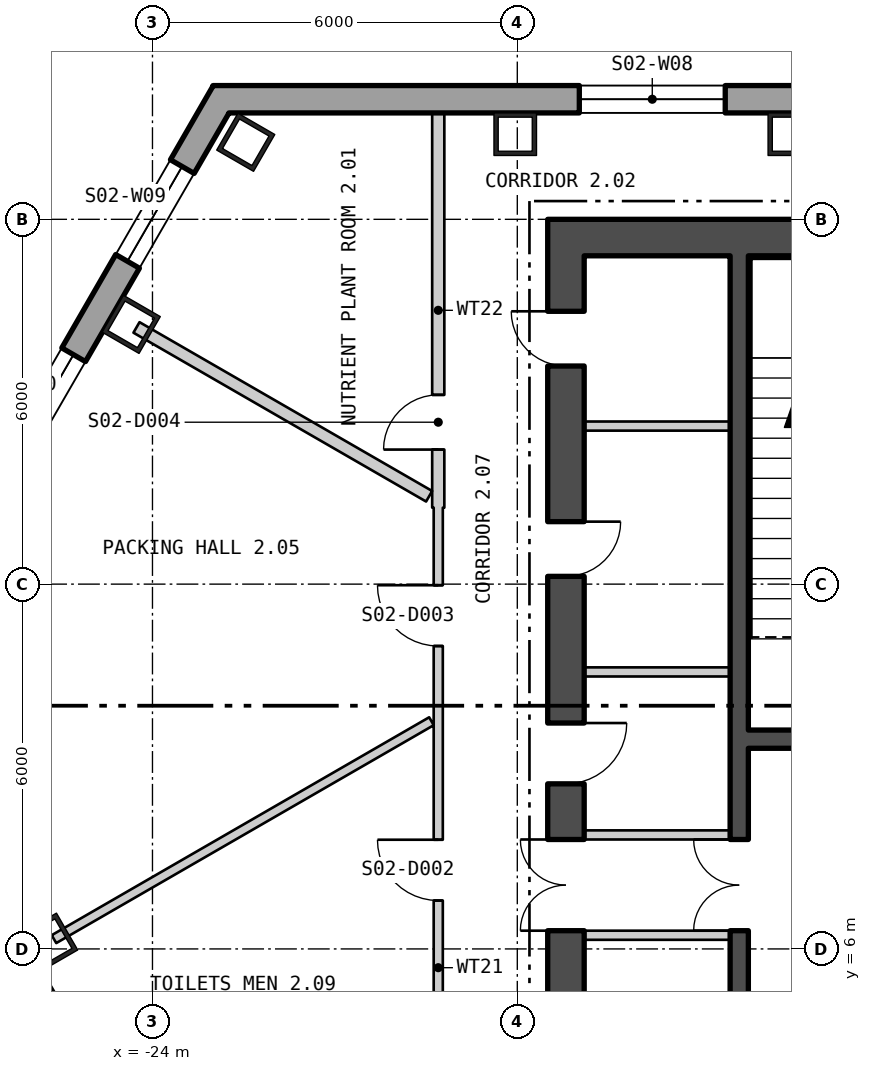
"""IFC4 building model, lengths in metres.
Left out: names, types, materials, properties, quantities, classifications, styles, units other than length and angle.
Written with IfcOpenShell. Run it as: python <this file> out.ifc"""

import sys

from ifc_helpers import new_model, si_unit, direction, frame, frame_2d, origin, origin_2d, place, context, subcontext, project, spatial, polyline, rectangle, hollow_rectangle, outline, extrude, element, fill, save


model = new_model("IFC4")
c1 = context("Model", 3, precision=1e-05, world=origin(), true_north=direction((0.0, 1.0)))
c2 = subcontext(c1, "Body", "Model", "MODEL_VIEW")
j1 = project(units=[si_unit("LENGTHUNIT", "METRE"), si_unit("PLANEANGLEUNIT", "RADIAN")], contexts=[c1])
p1 = place(None, origin())
s1 = spatial("IfcSite", under=j1, at=p1, CompositionType="ELEMENT")
p2 = place(p1, origin())
s2 = spatial("IfcBuilding", under=s1, at=p2, CompositionType="ELEMENT")
p3 = place(p2, frame((0.0, 0.0, 33.3)))
s3 = spatial("IfcBuildingStorey", under=s2, at=p3, CompositionType="ELEMENT", Elevation=33.3)
for number, where, z_axis, x_axis in (
    (1, (-13.526, 19.4, 0.0), (0.0, 0.0, 1.0), (-1.0, 0.0, 0.0)),
    (2, (-18.034, 19.4, 0.0), (0.0, 0.0, 1.0), (-1.0, 0.0, 0.0)),
    (3, (-22.466, 19.267, 0.0), (0.0, 0.0, 1.0), (-0.5, -0.866, 0.0)),
    (4, (-24.349, 16.272, 0.0), (0.0, 0.0, 1.0), (-0.5, -0.866, 0.0)),
    (5, (-25.707, 6.111, 0.0), (0.0, 0.0, 1.0), (0.5, -0.866, 0.0)),
):
    element("IfcColumn", number, at=place(p3, frame(where, z_axis=z_axis, x_axis=x_axis)), inside=s3, PredefinedType="COLUMN", context=c2, shape_type="SweptSolid", body=[
        extrude(hollow_rectangle(XDim=0.7, YDim=0.7, WallThickness=0.07, at=origin_2d()), origin(), (0.0, 0.0, 1.0), 4.5),
    ])
p4 = place(p3, frame((22.875, 19.975, -0.4), z_axis=(0.0, 0.0, 1.0), x_axis=(-1.0, 0.0, 0.0)))
e6 = element("IfcWall", 6, at=p4, inside=s3, PredefinedType="SOLIDWALL", context=c2, shape_type="SweptSolid", body=[
    extrude(outline(polyline([(-0.13, -0.225), (45.88, -0.225), (45.62, 0.225), (0.13, 0.225), (-0.13, -0.225)])), origin(), (0.0, 0.0, 1.0), 4.5),
])
p5 = place(p4, frame((5.895, 0.0, 1.3)))
e7 = element("IfcOpeningElement", 7, at=p5, cuts=e6, PredefinedType="OPENING", context=c2, shape_type="SweptSolid", body=[
    extrude(rectangle(XDim=2.4, YDim=2.6, at=frame_2d((1.2, 1.3))), frame((0.0, 0.235, 0.0), z_axis=(0.0, -1.0, 0.0), x_axis=(1.0, 0.0, 0.0)), (0.0, 0.0, 1.0), 0.47),
])
p6 = place(p4, frame((10.403, 0.0, 1.3)))
e8 = element("IfcOpeningElement", 8, at=p6, cuts=e6, PredefinedType="OPENING", context=c2, shape_type="SweptSolid", body=[
    extrude(rectangle(XDim=2.4, YDim=2.6, at=frame_2d((1.2, 1.3))), frame((0.0, 0.235, 0.0), z_axis=(0.0, -1.0, 0.0), x_axis=(1.0, 0.0, 0.0)), (0.0, 0.0, 1.0), 0.47),
])
p7 = place(p4, frame((14.912, 0.0, 1.3)))
e9 = element("IfcOpeningElement", 9, at=p7, cuts=e6, PredefinedType="OPENING", context=c2, shape_type="SweptSolid", body=[
    extrude(rectangle(XDim=2.4, YDim=2.6, at=frame_2d((1.2, 1.3))), frame((0.0, 0.235, 0.0), z_axis=(0.0, -1.0, 0.0), x_axis=(1.0, 0.0, 0.0)), (0.0, 0.0, 1.0), 0.47),
])
p8 = place(p4, frame((19.421, 0.0, 1.3)))
e10 = element("IfcOpeningElement", 10, at=p8, cuts=e6, PredefinedType="OPENING", context=c2, shape_type="SweptSolid", body=[
    extrude(rectangle(XDim=2.4, YDim=2.6, at=frame_2d((1.2, 1.3))), frame((0.0, 0.235, 0.0), z_axis=(0.0, -1.0, 0.0), x_axis=(1.0, 0.0, 0.0)), (0.0, 0.0, 1.0), 0.47),
])
p9 = place(p4, frame((23.929, 0.0, 1.3)))
e11 = element("IfcOpeningElement", 11, at=p9, cuts=e6, PredefinedType="OPENING", context=c2, shape_type="SweptSolid", body=[
    extrude(rectangle(XDim=2.4, YDim=2.6, at=frame_2d((1.2, 1.3))), frame((0.0, 0.235, 0.0), z_axis=(0.0, -1.0, 0.0), x_axis=(1.0, 0.0, 0.0)), (0.0, 0.0, 1.0), 0.47),
])
p10 = place(p4, frame((28.438, 0.0, 1.3)))
e12 = element("IfcOpeningElement", 12, at=p10, cuts=e6, PredefinedType="OPENING", context=c2, shape_type="SweptSolid", body=[
    extrude(rectangle(XDim=2.4, YDim=2.6, at=frame_2d((1.2, 1.3))), frame((0.0, 0.235, 0.0), z_axis=(0.0, -1.0, 0.0), x_axis=(1.0, 0.0, 0.0)), (0.0, 0.0, 1.0), 0.47),
])
p11 = place(p4, frame((32.947, 0.0, 1.3)))
e13 = element("IfcOpeningElement", 13, at=p11, cuts=e6, PredefinedType="OPENING", context=c2, shape_type="SweptSolid", body=[
    extrude(rectangle(XDim=2.4, YDim=2.6, at=frame_2d((1.2, 1.3))), frame((0.0, 0.235, 0.0), z_axis=(0.0, -1.0, 0.0), x_axis=(1.0, 0.0, 0.0)), (0.0, 0.0, 1.0), 0.47),
])
p12 = place(p4, frame((37.455, 0.0, 1.3)))
e14 = element("IfcOpeningElement", 14, at=p12, cuts=e6, PredefinedType="OPENING", context=c2, shape_type="SweptSolid", body=[
    extrude(rectangle(XDim=2.4, YDim=2.6, at=frame_2d((1.2, 1.3))), frame((0.0, 0.235, 0.0), z_axis=(0.0, -1.0, 0.0), x_axis=(1.0, 0.0, 0.0)), (0.0, 0.0, 1.0), 0.47),
])
p13 = place(p3, frame((-22.871, 19.973, -0.4), z_axis=(0.0, 0.0, 1.0), x_axis=(-0.500002460556, -0.866023983177, 0.0)))
e15 = element("IfcWall", 15, at=p13, inside=s3, PredefinedType="SOLIDWALL", context=c2, shape_type="SweptSolid", body=[
    extrude(outline(polyline([(-0.13, -0.225), (11.63, -0.225), (11.37, 0.225), (0.13, 0.225), (-0.13, -0.225)])), origin(), (0.0, 0.0, 1.0), 4.5),
])
p14 = place(p13, frame((1.276, 0.0, 1.3)))
e16 = element("IfcOpeningElement", 16, at=p14, cuts=e15, PredefinedType="OPENING", context=c2, shape_type="SweptSolid", body=[
    extrude(rectangle(XDim=1.8, YDim=2.6, at=frame_2d((0.9, 1.3))), frame((0.0, 0.235, 0.0), z_axis=(0.0, -1.0, 0.0), x_axis=(1.0, 0.0, 0.0)), (0.0, 0.0, 1.0), 0.47),
])
p15 = place(p13, frame((4.85, 0.0, 1.3)))
e17 = element("IfcOpeningElement", 17, at=p15, cuts=e15, PredefinedType="OPENING", context=c2, shape_type="SweptSolid", body=[
    extrude(rectangle(XDim=1.8, YDim=2.6, at=frame_2d((0.9, 1.3))), frame((0.0, 0.235, 0.0), z_axis=(0.0, -1.0, 0.0), x_axis=(1.0, 0.0, 0.0)), (0.0, 0.0, 1.0), 0.47),
])
p16 = place(p13, frame((8.424, 0.0, 1.3)))
e18 = element("IfcOpeningElement", 18, at=p16, cuts=e15, PredefinedType="OPENING", context=c2, shape_type="SweptSolid", body=[
    extrude(rectangle(XDim=1.8, YDim=2.6, at=frame_2d((0.9, 1.3))), frame((0.0, 0.235, 0.0), z_axis=(0.0, -1.0, 0.0), x_axis=(1.0, 0.0, 0.0)), (0.0, 0.0, 1.0), 0.47),
])
p17 = place(p3, frame((-28.625, 10.015, -0.18), z_axis=(0.0, 0.0, 1.0), x_axis=(0.500000335318, -0.866025210188, 0.0)))
e19 = element("IfcWall", 19, at=p17, inside=s3, PredefinedType="SOLIDWALL", context=c2, shape_type="SweptSolid", body=[
    extrude(outline(polyline([(-0.13, -0.225), (45.88, -0.225), (45.62, 0.225), (0.13, 0.225), (-0.13, -0.225)])), origin(), (0.0, 0.0, 1.0), 4.28),
])
p18 = place(p17, frame((1.425, 0.0, 1.08)))
e20 = element("IfcOpeningElement", 20, at=p18, cuts=e19, PredefinedType="OPENING", context=c2, shape_type="SweptSolid", body=[
    extrude(rectangle(XDim=2.4, YDim=2.6, at=frame_2d((1.2, 1.3))), frame((0.0, 0.235, 0.0), z_axis=(0.0, -1.0, 0.0), x_axis=(1.0, 0.0, 0.0)), (0.0, 0.0, 1.0), 0.47),
])
p19 = place(p17, frame((5.895, 0.0, 1.08)))
e21 = element("IfcOpeningElement", 21, at=p19, cuts=e19, PredefinedType="OPENING", context=c2, shape_type="SweptSolid", body=[
    extrude(rectangle(XDim=2.4, YDim=2.6, at=frame_2d((1.2, 1.3))), frame((0.0, 0.235, 0.0), z_axis=(0.0, -1.0, 0.0), x_axis=(1.0, 0.0, 0.0)), (0.0, 0.0, 1.0), 0.47),
])
p20 = place(p17, frame((10.403, 0.0, 1.08)))
e22 = element("IfcOpeningElement", 22, at=p20, cuts=e19, PredefinedType="OPENING", context=c2, shape_type="SweptSolid", body=[
    extrude(rectangle(XDim=2.4, YDim=2.6, at=frame_2d((1.2, 1.3))), frame((0.0, 0.235, 0.0), z_axis=(0.0, -1.0, 0.0), x_axis=(1.0, 0.0, 0.0)), (0.0, 0.0, 1.0), 0.47),
])
p21 = place(p17, frame((14.912, 0.0, 1.08)))
e23 = element("IfcOpeningElement", 23, at=p21, cuts=e19, PredefinedType="OPENING", context=c2, shape_type="SweptSolid", body=[
    extrude(rectangle(XDim=2.4, YDim=2.6, at=frame_2d((1.2, 1.3))), frame((0.0, 0.235, 0.0), z_axis=(0.0, -1.0, 0.0), x_axis=(1.0, 0.0, 0.0)), (0.0, 0.0, 1.0), 0.47),
])
p22 = place(p17, frame((19.421, 0.0, 1.08)))
e24 = element("IfcOpeningElement", 24, at=p22, cuts=e19, PredefinedType="OPENING", context=c2, shape_type="SweptSolid", body=[
    extrude(rectangle(XDim=2.4, YDim=2.6, at=frame_2d((1.2, 1.3))), frame((0.0, 0.235, 0.0), z_axis=(0.0, -1.0, 0.0), x_axis=(1.0, 0.0, 0.0)), (0.0, 0.0, 1.0), 0.47),
])
p23 = place(p17, frame((23.929, 0.0, 1.08)))
e25 = element("IfcOpeningElement", 25, at=p23, cuts=e19, PredefinedType="OPENING", context=c2, shape_type="SweptSolid", body=[
    extrude(rectangle(XDim=2.4, YDim=2.6, at=frame_2d((1.2, 1.3))), frame((0.0, 0.235, 0.0), z_axis=(0.0, -1.0, 0.0), x_axis=(1.0, 0.0, 0.0)), (0.0, 0.0, 1.0), 0.47),
])
p24 = place(p17, frame((28.438, 0.0, 1.08)))
e26 = element("IfcOpeningElement", 26, at=p24, cuts=e19, PredefinedType="OPENING", context=c2, shape_type="SweptSolid", body=[
    extrude(rectangle(XDim=2.4, YDim=2.6, at=frame_2d((1.2, 1.3))), frame((0.0, 0.235, 0.0), z_axis=(0.0, -1.0, 0.0), x_axis=(1.0, 0.0, 0.0)), (0.0, 0.0, 1.0), 0.47),
])
p25 = place(p17, frame((32.947, 0.0, 1.08)))
e27 = element("IfcOpeningElement", 27, at=p25, cuts=e19, PredefinedType="OPENING", context=c2, shape_type="SweptSolid", body=[
    extrude(rectangle(XDim=2.4, YDim=2.6, at=frame_2d((1.2, 1.3))), frame((0.0, 0.235, 0.0), z_axis=(0.0, -1.0, 0.0), x_axis=(1.0, 0.0, 0.0)), (0.0, 0.0, 1.0), 0.47),
])
p26 = place(p17, frame((37.455, 0.0, 1.08)))
e28 = element("IfcOpeningElement", 28, at=p26, cuts=e19, PredefinedType="OPENING", context=c2, shape_type="SweptSolid", body=[
    extrude(rectangle(XDim=2.4, YDim=2.6, at=frame_2d((1.2, 1.3))), frame((0.0, 0.235, 0.0), z_axis=(0.0, -1.0, 0.0), x_axis=(1.0, 0.0, 0.0)), (0.0, 0.0, 1.0), 0.47),
])
p27 = place(p17, frame((41.925, 0.0, 1.08)))
e29 = element("IfcOpeningElement", 29, at=p27, cuts=e19, PredefinedType="OPENING", context=c2, shape_type="SweptSolid", body=[
    extrude(rectangle(XDim=2.4, YDim=2.6, at=frame_2d((1.2, 1.3))), frame((0.0, 0.235, 0.0), z_axis=(0.0, -1.0, 0.0), x_axis=(1.0, 0.0, 0.0)), (0.0, 0.0, 1.0), 0.47),
])
p28 = place(p3, frame((-17.5, 17.7, 0.0), z_axis=(0.0, 0.0, 1.0), x_axis=(1.0, 0.0, 0.0)))
e30 = element("IfcWall", 30, at=p28, inside=s3, PredefinedType="SHEAR", context=c2, shape_type="SweptSolid", body=[
    extrude(rectangle(XDim=35.0, YDim=0.6, at=frame_2d((17.5, 0.0))), origin(), (0.0, 0.0, 1.0), 4.3),
])
p29 = place(p3, frame((-17.2, 0.6, 0.0), z_axis=(0.0, 0.0, 1.0), x_axis=(0.0, 1.0, 0.0)))
e31 = element("IfcWall", 31, at=p29, inside=s3, PredefinedType="SHEAR", context=c2, shape_type="SweptSolid", body=[
    extrude(rectangle(XDim=16.8, YDim=0.6, at=frame_2d((8.4, 0.0))), origin(), (0.0, 0.0, 1.0), 4.3),
])
p30 = place(p29, frame((5.7, 0.0, 0.0)))
e32 = element("IfcOpeningElement", 32, at=p30, cuts=e31, PredefinedType="OPENING", context=c2, shape_type="SweptSolid", body=[
    extrude(rectangle(XDim=1.5, YDim=2.1, at=frame_2d((0.75, 1.05))), frame((0.0, 0.31, 0.0), z_axis=(0.0, -1.0, 0.0), x_axis=(1.0, 0.0, 0.0)), (0.0, 0.0, 1.0), 0.62),
])
p31 = place(p29, frame((0.875, 0.0, 0.0)))
e33 = element("IfcOpeningElement", 33, at=p31, cuts=e31, PredefinedType="OPENING", context=c2, shape_type="SweptSolid", body=[
    extrude(rectangle(XDim=0.9, YDim=2.1, at=frame_2d((0.45, 1.05))), frame((0.0, 0.31, 0.0), z_axis=(0.0, -1.0, 0.0), x_axis=(1.0, 0.0, 0.0)), (0.0, 0.0, 1.0), 0.62),
])
p32 = place(p29, frame((3.724, 0.0, 0.0)))
e34 = element("IfcOpeningElement", 34, at=p32, cuts=e31, PredefinedType="OPENING", context=c2, shape_type="SweptSolid", body=[
    extrude(rectangle(XDim=0.9, YDim=2.1, at=frame_2d((0.45, 1.05))), frame((0.0, 0.31, 0.0), z_axis=(0.0, -1.0, 0.0), x_axis=(1.0, 0.0, 0.0)), (0.0, 0.0, 1.0), 0.62),
])
p33 = place(p29, frame((8.115, 0.0, 0.0)))
e35 = element("IfcOpeningElement", 35, at=p33, cuts=e31, PredefinedType="OPENING", context=c2, shape_type="SweptSolid", body=[
    extrude(rectangle(XDim=1.0, YDim=2.1, at=frame_2d((0.5, 1.05))), frame((0.0, 0.31, 0.0), z_axis=(0.0, -1.0, 0.0), x_axis=(1.0, 0.0, 0.0)), (0.0, 0.0, 1.0), 0.62),
])
p34 = place(p29, frame((11.528, 0.0, 0.0)))
e36 = element("IfcOpeningElement", 36, at=p34, cuts=e31, PredefinedType="OPENING", context=c2, shape_type="SweptSolid", body=[
    extrude(rectangle(XDim=0.9, YDim=2.1, at=frame_2d((0.45, 1.05))), frame((0.0, 0.31, 0.0), z_axis=(0.0, -1.0, 0.0), x_axis=(1.0, 0.0, 0.0)), (0.0, 0.0, 1.0), 0.62),
])
p35 = place(p29, frame((14.987, 0.0, 0.0)))
e37 = element("IfcOpeningElement", 37, at=p35, cuts=e31, PredefinedType="OPENING", context=c2, shape_type="SweptSolid", body=[
    extrude(rectangle(XDim=0.9, YDim=2.1, at=frame_2d((0.45, 1.05))), frame((0.0, 0.31, 0.0), z_axis=(0.0, -1.0, 0.0), x_axis=(1.0, 0.0, 0.0)), (0.0, 0.0, 1.0), 0.62),
])
p36 = place(p3, frame((-14.35, 0.6, 0.0), z_axis=(0.0, 0.0, 1.0), x_axis=(0.0, 1.0, 0.0)))
e38 = element("IfcWall", 38, at=p36, inside=s3, PredefinedType="SHEAR", context=c2, shape_type="SweptSolid", body=[
    extrude(rectangle(XDim=16.8, YDim=0.3, at=frame_2d((8.4, 0.0))), origin(), (0.0, 0.0, 1.0), 4.3),
])
p37 = place(p36, frame((5.7, 0.0, 0.0)))
e39 = element("IfcOpeningElement", 39, at=p37, cuts=e38, PredefinedType="OPENING", context=c2, shape_type="SweptSolid", body=[
    extrude(rectangle(XDim=1.5, YDim=2.1, at=frame_2d((0.75, 1.05))), frame((0.0, 0.16, 0.0), z_axis=(0.0, -1.0, 0.0), x_axis=(1.0, 0.0, 0.0)), (0.0, 0.0, 1.0), 0.32),
])
p38 = place(p3, frame((-14.2, 9.45, 0.0), z_axis=(0.0, 0.0, 1.0), x_axis=(1.0, 0.0, 0.0)))
e40 = element("IfcWall", 40, at=p38, inside=s3, PredefinedType="SHEAR", context=c2, shape_type="SweptSolid", body=[
    extrude(rectangle(XDim=3.2, YDim=0.3, at=frame_2d((1.6, 0.0))), origin(), (0.0, 0.0, 1.0), 4.3),
])
p39 = place(p38, frame((1.0, 0.0, 0.0)))
e41 = element("IfcOpeningElement", 41, at=p39, cuts=e40, PredefinedType="OPENING", context=c2, shape_type="SweptSolid", body=[
    extrude(rectangle(XDim=1.2, YDim=2.1, at=frame_2d((0.6, 1.05))), frame((0.0, 0.16, 0.0), z_axis=(0.0, -1.0, 0.0), x_axis=(1.0, 0.0, 0.0)), (0.0, 0.0, 1.0), 0.32),
])
for number, where, z_axis, x_axis in (
    (42, (-16.9, 6.225, 0.0), (0.0, 0.0, 1.0), (1.0, 0.0, 0.0)),
    (43, (-16.9, 7.875, 0.0), (0.0, 0.0, 1.0), (1.0, 0.0, 0.0)),
    (44, (-16.9, 10.556, 0.0), (0.0, 0.0, 1.0), (1.0, 0.0, 0.0)),
    (45, (-16.9, 14.6, 0.0), (0.0, 0.0, 1.0), (1.0, 0.0, 0.0)),
):
    element("IfcWall", number, at=place(p3, frame(where, z_axis=z_axis, x_axis=x_axis)), inside=s3, PredefinedType="PARTITIONING", context=c2, shape_type="SweptSolid", body=[
        extrude(rectangle(XDim=2.4, YDim=0.15, at=frame_2d((1.2, 0.0))), origin(), (0.0, 0.0, 1.0), 4.3),
    ])
p40 = place(p3, frame((-25.62, 6.161, 0.0), z_axis=(0.0, 0.0, 1.0), x_axis=(0.866036909293, 0.499980071345, 0.0)))
e46 = element("IfcWall", 46, at=p40, inside=s3, PredefinedType="PARTITIONING", context=c2, shape_type="SweptSolid", body=[
    extrude(rectangle(XDim=7.168, YDim=0.15, at=frame_2d((3.584, 0.0))), origin(), (0.0, 0.0, 1.0), 4.3),
])
p41 = place(p3, frame((-24.263, 16.222, 0.0), z_axis=(0.0, 0.0, 1.0), x_axis=(0.86616461284, -0.499758805289, 0.0)))
e47 = element("IfcWall", 47, at=p41, inside=s3, PredefinedType="PARTITIONING", context=c2, shape_type="SweptSolid", body=[
    extrude(rectangle(XDim=5.557, YDim=0.2, at=frame_2d((2.778, 0.0))), origin(), (0.0, 0.0, 1.0), 4.3),
])
p42 = place(p3, frame((-19.3, -1.875, 0.0), z_axis=(0.0, 0.0, 1.0), x_axis=(0.0, 1.0, 0.0)))
e48 = element("IfcWall", 48, at=p42, inside=s3, PredefinedType="PARTITIONING", context=c2, shape_type="SweptSolid", body=[
    extrude(rectangle(XDim=15.133, YDim=0.15, at=frame_2d((7.566, 0.0))), origin(), (0.0, 0.0, 1.0), 4.3),
])
p43 = place(p42, frame((4.842, 0.0, 0.0)))
e49 = element("IfcOpeningElement", 49, at=p43, cuts=e48, PredefinedType="OPENING", context=c2, shape_type="SweptSolid", body=[
    extrude(rectangle(XDim=1.0, YDim=2.1, at=frame_2d((0.5, 1.05))), frame((0.0, 0.085, 0.0), z_axis=(0.0, -1.0, 0.0), x_axis=(1.0, 0.0, 0.0)), (0.0, 0.0, 1.0), 0.17),
])
p44 = place(p42, frame((8.671, 0.0, 0.0)))
e50 = element("IfcOpeningElement", 50, at=p44, cuts=e48, PredefinedType="OPENING", context=c2, shape_type="SweptSolid", body=[
    extrude(rectangle(XDim=1.0, YDim=2.1, at=frame_2d((0.5, 1.05))), frame((0.0, 0.085, 0.0), z_axis=(0.0, -1.0, 0.0), x_axis=(1.0, 0.0, 0.0)), (0.0, 0.0, 1.0), 0.17),
])
p45 = place(p42, frame((12.857, 0.0, 0.0)))
e51 = element("IfcOpeningElement", 51, at=p45, cuts=e48, PredefinedType="OPENING", context=c2, shape_type="SweptSolid", body=[
    extrude(rectangle(XDim=1.0, YDim=2.1, at=frame_2d((0.5, 1.05))), frame((0.0, 0.085, 0.0), z_axis=(0.0, -1.0, 0.0), x_axis=(1.0, 0.0, 0.0)), (0.0, 0.0, 1.0), 0.17),
])
p46 = place(p3, frame((-19.3, 13.258, 0.0), z_axis=(0.0, 0.0, 1.0), x_axis=(0.0, 1.0, 0.0)))
e52 = element("IfcWall", 52, at=p46, inside=s3, PredefinedType="PARTITIONING", context=c2, shape_type="SweptSolid", body=[
    extrude(rectangle(XDim=6.491, YDim=0.2, at=frame_2d((3.245, 0.0))), origin(), (0.0, 0.0, 1.0), 4.3),
])
p47 = place(p46, frame((0.955, 0.0, 0.0)))
e53 = element("IfcOpeningElement", 53, at=p47, cuts=e52, PredefinedType="OPENING", context=c2, shape_type="SweptSolid", body=[
    extrude(rectangle(XDim=0.9, YDim=2.1, at=frame_2d((0.45, 1.05))), frame((0.0, 0.11, 0.0), z_axis=(0.0, -1.0, 0.0), x_axis=(1.0, 0.0, 0.0)), (0.0, 0.0, 1.0), 0.22),
])
p48 = place(p12, origin())
e54 = element("IfcWindow", 54, at=p48, inside=s3, PartitioningType="SINGLE_PANEL", PredefinedType="WINDOW", context=c2, shape_type="SweptSolid", body=[
    extrude(rectangle(XDim=2.4, YDim=2.6, at=frame_2d((1.2, 1.3))), frame((0.0, 0.105, 0.0), z_axis=(0.0, -1.0, 0.0), x_axis=(1.0, 0.0, 0.0)), (0.0, 0.0, 1.0), 0.06),
])
fill(e14, e54)
p49 = place(p14, origin())
e55 = element("IfcWindow", 55, at=p49, inside=s3, PartitioningType="SINGLE_PANEL", PredefinedType="WINDOW", context=c2, shape_type="SweptSolid", body=[
    extrude(rectangle(XDim=1.8, YDim=2.6, at=frame_2d((0.9, 1.3))), frame((0.0, 0.105, 0.0), z_axis=(0.0, -1.0, 0.0), x_axis=(1.0, 0.0, 0.0)), (0.0, 0.0, 1.0), 0.06),
])
fill(e16, e55)
p50 = place(p15, origin())
e56 = element("IfcWindow", 56, at=p50, inside=s3, PartitioningType="SINGLE_PANEL", PredefinedType="WINDOW", context=c2, shape_type="SweptSolid", body=[
    extrude(rectangle(XDim=1.8, YDim=2.6, at=frame_2d((0.9, 1.3))), frame((0.0, 0.105, 0.0), z_axis=(0.0, -1.0, 0.0), x_axis=(1.0, 0.0, 0.0)), (0.0, 0.0, 1.0), 0.06),
])
fill(e17, e56)
p51 = place(p37, origin())
e57 = element("IfcDoor", 57, at=p51, inside=s3, OperationType="DOUBLE_DOOR_SINGLE_SWING", PredefinedType="DOOR", context=c2, shape_type="SweptSolid", body=[
    extrude(rectangle(XDim=1.5, YDim=2.1, at=frame_2d((0.75, 1.05))), frame((0.0, 0.025, 0.0), z_axis=(0.0, -1.0, 0.0), x_axis=(1.0, 0.0, 0.0)), (0.0, 0.0, 1.0), 0.05),
])
fill(e39, e57)
p52 = place(p30, origin())
e58 = element("IfcDoor", 58, at=p52, inside=s3, OperationType="DOUBLE_DOOR_SINGLE_SWING", PredefinedType="DOOR", context=c2, shape_type="SweptSolid", body=[
    extrude(rectangle(XDim=1.5, YDim=2.1, at=frame_2d((0.75, 1.05))), frame((0.0, 0.025, 0.0), z_axis=(0.0, -1.0, 0.0), x_axis=(1.0, 0.0, 0.0)), (0.0, 0.0, 1.0), 0.05),
])
fill(e32, e58)
p53 = place(p33, origin())
e59 = element("IfcDoor", 59, at=p53, inside=s3, OperationType="SINGLE_SWING_RIGHT", PredefinedType="DOOR", context=c2, shape_type="SweptSolid", body=[
    extrude(rectangle(XDim=1.0, YDim=2.1, at=frame_2d((0.5, 1.05))), frame((0.0, 0.025, 0.0), z_axis=(0.0, -1.0, 0.0), x_axis=(1.0, 0.0, 0.0)), (0.0, 0.0, 1.0), 0.05),
])
fill(e35, e59)
p54 = place(p34, origin())
e60 = element("IfcDoor", 60, at=p54, inside=s3, OperationType="SINGLE_SWING_RIGHT", PredefinedType="DOOR", context=c2, shape_type="SweptSolid", body=[
    extrude(rectangle(XDim=0.9, YDim=2.1, at=frame_2d((0.45, 1.05))), frame((0.0, 0.025, 0.0), z_axis=(0.0, -1.0, 0.0), x_axis=(1.0, 0.0, 0.0)), (0.0, 0.0, 1.0), 0.05),
])
fill(e36, e60)
p55 = place(p35, origin())
e61 = element("IfcDoor", 61, at=p55, inside=s3, OperationType="SINGLE_SWING_LEFT", PredefinedType="DOOR", context=c2, shape_type="SweptSolid", body=[
    extrude(rectangle(XDim=0.9, YDim=2.1, at=frame_2d((0.45, 1.05))), frame((0.0, 0.025, 0.0), z_axis=(0.0, -1.0, 0.0), x_axis=(1.0, 0.0, 0.0)), (0.0, 0.0, 1.0), 0.05),
])
fill(e37, e61)
p56 = place(p44, origin())
e62 = element("IfcDoor", 62, at=p56, inside=s3, OperationType="SINGLE_SWING_LEFT", PredefinedType="DOOR", context=c2, shape_type="SweptSolid", body=[
    extrude(rectangle(XDim=1.0, YDim=2.1, at=frame_2d((0.5, 1.05))), frame((0.0, 0.025, 0.0), z_axis=(0.0, -1.0, 0.0), x_axis=(1.0, 0.0, 0.0)), (0.0, 0.0, 1.0), 0.05),
])
fill(e50, e62)
p57 = place(p45, origin())
e63 = element("IfcDoor", 63, at=p57, inside=s3, OperationType="SINGLE_SWING_LEFT", PredefinedType="DOOR", context=c2, shape_type="SweptSolid", body=[
    extrude(rectangle(XDim=1.0, YDim=2.1, at=frame_2d((0.5, 1.05))), frame((0.0, 0.025, 0.0), z_axis=(0.0, -1.0, 0.0), x_axis=(1.0, 0.0, 0.0)), (0.0, 0.0, 1.0), 0.05),
])
fill(e51, e63)
p58 = place(p47, origin())
e64 = element("IfcDoor", 64, at=p58, inside=s3, OperationType="SINGLE_SWING_RIGHT", PredefinedType="DOOR", context=c2, shape_type="SweptSolid", body=[
    extrude(rectangle(XDim=0.9, YDim=2.1, at=frame_2d((0.45, 1.05))), frame((0.0, 0.025, 0.0), z_axis=(0.0, -1.0, 0.0), x_axis=(1.0, 0.0, 0.0)), (0.0, 0.0, 1.0), 0.05),
])
fill(e53, e64)
save(model, sys.argv[1])
